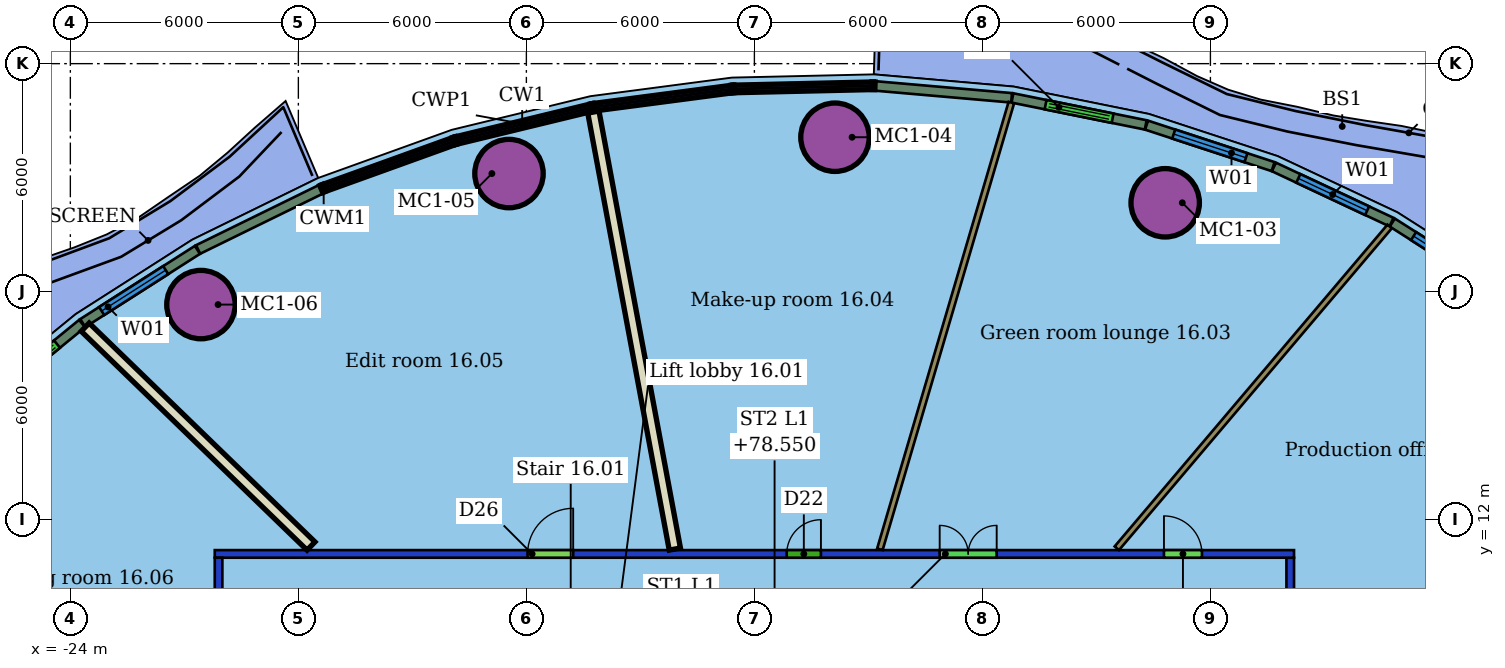
"""IFC4 building model, lengths in metres.
Left out: names, types, materials, properties, quantities, classifications, styles, units other than length and angle.
Written with IfcOpenShell. Run it as: python <this file> out.ifc"""

import sys

from ifc_helpers import new_model, si_unit, direction, frame, frame_2d, origin, origin_2d, place, context, subcontext, project, spatial, rectangle, hollow_circle, extrude, element, fill, save


model = new_model("IFC4")
c1 = context("Model", 3, precision=1e-05, world=origin(), true_north=direction((0.0, 1.0)))
c2 = subcontext(c1, "Body", "Model", "MODEL_VIEW")
j1 = project(units=[si_unit("LENGTHUNIT", "METRE"), si_unit("PLANEANGLEUNIT", "RADIAN")], contexts=[c1])
p1 = place(None, origin())
s1 = spatial("IfcSite", under=j1, at=p1, CompositionType="ELEMENT")
p2 = place(p1, origin())
s2 = spatial("IfcBuilding", under=s1, at=p2, CompositionType="ELEMENT")
p3 = place(p2, frame((0.0, 0.0, 76.7)))
s3 = spatial("IfcBuildingStorey", under=s2, at=p3, CompositionType="ELEMENT", Elevation=76.7)
for number, where, z_axis, x_axis in (
    (1, (4.81, 20.339, 0.0), (0.0, 0.0, 1.0), (1.0, 0.0, 0.0)),
    (2, (-3.879, 22.064, 0.0), (0.0, 0.0, 1.0), (1.0, 0.0, 0.0)),
    (3, (-12.458, 21.108, 0.0), (0.0, 0.0, 1.0), (1.0, 0.0, 0.0)),
    (4, (-20.563, 17.66, 0.0), (0.0, 0.0, 1.0), (1.0, 0.0, 0.0)),
):
    element("IfcColumn", number, at=place(p3, frame(where, z_axis=z_axis, x_axis=x_axis)), inside=s3, PredefinedType="COLUMN", context=c2, shape_type="SweptSolid", body=[
        extrude(hollow_circle(Radius=0.9, WallThickness=0.06, at=origin_2d()), origin(), (0.0, 0.0, 1.0), 3.55),
    ])
p4 = place(p3, frame((-20.1, -11.0, 0.0), z_axis=(0.0, 0.0, 1.0), x_axis=(0.0, 1.0, 0.0)))
e5 = element("IfcWall", 5, at=p4, inside=s3, PredefinedType="PARTITIONING", context=c2, shape_type="SweptSolid", body=[
    extrude(rectangle(XDim=22.0, YDim=0.2, at=frame_2d((11.0, 0.0))), origin(), (0.0, 0.0, 1.0), 2.85),
])
p5 = place(p4, frame((18.191, 0.0, 0.0)))
e6 = element("IfcOpeningElement", 6, at=p5, cuts=e5, PredefinedType="OPENING", context=c2, shape_type="SweptSolid", body=[
    extrude(rectangle(XDim=0.9, YDim=2.1, at=frame_2d((0.45, 1.05))), frame((0.0, 0.11, 0.0), z_axis=(0.0, -1.0, 0.0), x_axis=(1.0, 0.0, 0.0)), (0.0, 0.0, 1.0), 0.22),
])
p6 = place(p4, frame((14.06, 0.0, 0.0)))
e7 = element("IfcOpeningElement", 7, at=p6, cuts=e5, PredefinedType="OPENING", context=c2, shape_type="SweptSolid", body=[
    extrude(rectangle(XDim=1.1, YDim=2.1, at=frame_2d((0.55, 1.05))), frame((0.0, 0.11, 0.0), z_axis=(0.0, -1.0, 0.0), x_axis=(1.0, 0.0, 0.0)), (0.0, 0.0, 1.0), 0.22),
])
p7 = place(p4, frame((9.116, 0.0, 0.0)))
e8 = element("IfcOpeningElement", 8, at=p7, cuts=e5, PredefinedType="OPENING", context=c2, shape_type="SweptSolid", body=[
    extrude(rectangle(XDim=1.2, YDim=2.1, at=frame_2d((0.6, 1.05))), frame((0.0, 0.11, 0.0), z_axis=(0.0, -1.0, 0.0), x_axis=(1.0, 0.0, 0.0)), (0.0, 0.0, 1.0), 0.22),
])
p8 = place(p4, frame((5.868, 0.0, 0.0)))
e9 = element("IfcOpeningElement", 9, at=p8, cuts=e5, PredefinedType="OPENING", context=c2, shape_type="SweptSolid", body=[
    extrude(rectangle(XDim=1.0, YDim=2.1, at=frame_2d((0.5, 1.05))), frame((0.0, 0.11, 0.0), z_axis=(0.0, -1.0, 0.0), x_axis=(1.0, 0.0, 0.0)), (0.0, 0.0, 1.0), 0.22),
])
p9 = place(p3, frame((-20.2, 11.1, 0.0), z_axis=(0.0, 0.0, 1.0), x_axis=(1.0, 0.0, 0.0)))
e10 = element("IfcWall", 10, at=p9, inside=s3, PredefinedType="PARTITIONING", context=c2, shape_type="SweptSolid", body=[
    extrude(rectangle(XDim=28.4, YDim=0.2, at=frame_2d((14.2, 0.0))), origin(), (0.0, 0.0, 1.0), 2.85),
])
p10 = place(p9, frame((24.977, 0.0, 0.0)))
e11 = element("IfcOpeningElement", 11, at=p10, cuts=e10, PredefinedType="OPENING", context=c2, shape_type="SweptSolid", body=[
    extrude(rectangle(XDim=1.0, YDim=2.1, at=frame_2d((0.5, 1.05))), frame((0.0, 0.11, 0.0), z_axis=(0.0, -1.0, 0.0), x_axis=(1.0, 0.0, 0.0)), (0.0, 0.0, 1.0), 0.22),
])
p11 = place(p9, frame((19.076, 0.0, 0.0)))
e12 = element("IfcOpeningElement", 12, at=p11, cuts=e10, PredefinedType="OPENING", context=c2, shape_type="SweptSolid", body=[
    extrude(rectangle(XDim=1.5, YDim=2.1, at=frame_2d((0.75, 1.05))), frame((0.0, 0.11, 0.0), z_axis=(0.0, -1.0, 0.0), x_axis=(1.0, 0.0, 0.0)), (0.0, 0.0, 1.0), 0.22),
])
p12 = place(p9, frame((15.051, 0.0, 0.0)))
e13 = element("IfcOpeningElement", 13, at=p12, cuts=e10, PredefinedType="OPENING", context=c2, shape_type="SweptSolid", body=[
    extrude(rectangle(XDim=0.9, YDim=2.1, at=frame_2d((0.45, 1.05))), frame((0.0, 0.11, 0.0), z_axis=(0.0, -1.0, 0.0), x_axis=(1.0, 0.0, 0.0)), (0.0, 0.0, 1.0), 0.22),
])
p13 = place(p9, frame((8.231, 0.0, 0.0)))
e14 = element("IfcOpeningElement", 14, at=p13, cuts=e10, PredefinedType="OPENING", context=c2, shape_type="SweptSolid", body=[
    extrude(rectangle(XDim=1.2, YDim=2.1, at=frame_2d((0.6, 1.05))), frame((0.0, 0.11, 0.0), z_axis=(0.0, -1.0, 0.0), x_axis=(1.0, 0.0, 0.0)), (0.0, 0.0, 1.0), 0.22),
])
p14 = place(p3, frame((8.1, 11.0, 0.0), z_axis=(0.0, 0.0, 1.0), x_axis=(0.0, -1.0, 0.0)))
e15 = element("IfcWall", 15, at=p14, inside=s3, PredefinedType="PARTITIONING", context=c2, shape_type="SweptSolid", body=[
    extrude(rectangle(XDim=22.0, YDim=0.2, at=frame_2d((11.0, 0.0))), origin(), (0.0, 0.0, 1.0), 2.85),
])
p15 = place(p14, frame((5.898, 0.0, 0.0)))
e16 = element("IfcOpeningElement", 16, at=p15, cuts=e15, PredefinedType="OPENING", context=c2, shape_type="SweptSolid", body=[
    extrude(rectangle(XDim=1.0, YDim=2.1, at=frame_2d((0.5, 1.05))), frame((0.0, 0.11, 0.0), z_axis=(0.0, -1.0, 0.0), x_axis=(1.0, 0.0, 0.0)), (0.0, 0.0, 1.0), 0.22),
])
p16 = place(p14, frame((16.7, 0.0, 0.0)))
e17 = element("IfcOpeningElement", 17, at=p16, cuts=e15, PredefinedType="OPENING", context=c2, shape_type="SweptSolid", body=[
    extrude(rectangle(XDim=1.5, YDim=2.1, at=frame_2d((0.75, 1.05))), frame((0.0, 0.11, 0.0), z_axis=(0.0, -1.0, 0.0), x_axis=(1.0, 0.0, 0.0)), (0.0, 0.0, 1.0), 0.22),
])
p17 = place(p14, frame((12.749, 0.0, 0.0)))
e18 = element("IfcOpeningElement", 18, at=p17, cuts=e15, PredefinedType="OPENING", context=c2, shape_type="SweptSolid", body=[
    extrude(rectangle(XDim=1.1, YDim=2.1, at=frame_2d((0.55, 1.05))), frame((0.0, 0.11, 0.0), z_axis=(0.0, -1.0, 0.0), x_axis=(1.0, 0.0, 0.0)), (0.0, 0.0, 1.0), 0.22),
])
p18 = place(p14, frame((9.026, 0.0, 0.0)))
e19 = element("IfcOpeningElement", 19, at=p18, cuts=e15, PredefinedType="OPENING", context=c2, shape_type="SweptSolid", body=[
    extrude(rectangle(XDim=1.5, YDim=2.1, at=frame_2d((0.75, 1.05))), frame((0.0, 0.11, 0.0), z_axis=(0.0, -1.0, 0.0), x_axis=(1.0, 0.0, 0.0)), (0.0, 0.0, 1.0), 0.22),
])
p19 = place(p3, frame((18.104, 13.463, 0.0), z_axis=(0.0, 0.0, 1.0), x_axis=(-0.873053971866, -0.4876235866, 0.0)))
e20 = element("IfcWall", 20, at=p19, inside=s3, PredefinedType="PARTITIONING", context=c2, shape_type="SweptSolid", body=[
    extrude(rectangle(XDim=11.317, YDim=0.1, at=frame_2d((5.658, 0.0))), origin(), (0.0, 0.0, 1.0), 3.55),
])
p20 = place(p3, frame((10.716, 19.716, 0.0), z_axis=(0.0, 0.0, 1.0), x_axis=(-0.646692205785, -0.762751067503, 0.0)))
e21 = element("IfcWall", 21, at=p20, inside=s3, PredefinedType="PARTITIONING", context=c2, shape_type="SweptSolid", body=[
    extrude(rectangle(XDim=11.101, YDim=0.15, at=frame_2d((5.55, 0.0))), origin(), (0.0, 0.0, 1.0), 3.55),
])
p21 = place(p3, frame((0.762, 22.976, 0.0), z_axis=(0.0, 0.0, 1.0), x_axis=(-0.282322729793, -0.959319486012, 0.0)))
e22 = element("IfcWall", 22, at=p21, inside=s3, PredefinedType="PARTITIONING", context=c2, shape_type="SweptSolid", body=[
    extrude(rectangle(XDim=12.254, YDim=0.15, at=frame_2d((6.127, 0.0))), origin(), (0.0, 0.0, 1.0), 3.55),
])
p22 = place(p3, frame((-10.237, 22.726, 0.0), z_axis=(0.0, 0.0, 1.0), x_axis=(0.183262598903, -0.983063995803, 0.0)))
e23 = element("IfcWall", 23, at=p22, inside=s3, PredefinedType="PARTITIONING", context=c2, shape_type="SweptSolid", body=[
    extrude(rectangle(XDim=11.697, YDim=0.3, at=frame_2d((5.848, 0.0))), origin(), (0.0, 0.0, 1.0), 3.55),
])
p23 = place(p3, frame((-23.609, 17.066, 0.0), z_axis=(0.0, 0.0, 1.0), x_axis=(0.718084916204, -0.695955496508, 0.0)))
e24 = element("IfcWall", 24, at=p23, inside=s3, PredefinedType="PARTITIONING", context=c2, shape_type="SweptSolid", body=[
    extrude(rectangle(XDim=8.274, YDim=0.3, at=frame_2d((4.137, 0.0))), origin(), (0.0, 0.0, 1.0), 3.55),
])
p24 = place(p3, frame((13.592, 18.031, 0.0), z_axis=(0.0, 0.0, 1.0), x_axis=(-0.843428771265, 0.537241014632, 0.0)))
e25 = element("IfcWall", 25, at=p24, inside=s3, PredefinedType="SOLIDWALL", context=c2, shape_type="SweptSolid", body=[
    extrude(rectangle(XDim=3.327, YDim=0.25, at=frame_2d((1.664, 0.0))), origin(), (0.0, 0.0, 1.0), 3.15),
])
p25 = place(p24, frame((0.664, 0.0, 0.8)))
e26 = element("IfcOpeningElement", 26, at=p25, cuts=e25, PredefinedType="OPENING", context=c2, shape_type="SweptSolid", body=[
    extrude(rectangle(XDim=2.0, YDim=2.2, at=frame_2d((1.0, 1.1))), frame((0.0, 0.135, 0.0), z_axis=(0.0, -1.0, 0.0), x_axis=(1.0, 0.0, 0.0)), (0.0, 0.0, 1.0), 0.27),
])
p26 = place(p3, frame((10.765, 19.83, 0.0), z_axis=(0.0, 0.0, 1.0), x_axis=(-0.905237504744, 0.424905942538, 0.0)))
e27 = element("IfcWall", 27, at=p26, inside=s3, PredefinedType="SOLIDWALL", context=c2, shape_type="SweptSolid", body=[
    extrude(rectangle(XDim=3.418, YDim=0.25, at=frame_2d((1.709, 0.0))), origin(), (0.0, 0.0, 1.0), 3.15),
])
p27 = place(p26, frame((0.709, 0.0, 0.8)))
e28 = element("IfcOpeningElement", 28, at=p27, cuts=e27, PredefinedType="OPENING", context=c2, shape_type="SweptSolid", body=[
    extrude(rectangle(XDim=2.0, YDim=2.2, at=frame_2d((1.0, 1.1))), frame((0.0, 0.135, 0.0), z_axis=(0.0, -1.0, 0.0), x_axis=(1.0, 0.0, 0.0)), (0.0, 0.0, 1.0), 0.27),
])
p28 = place(p3, frame((7.649, 21.291, 0.0), z_axis=(0.0, 0.0, 1.0), x_axis=(-0.950294453708, 0.311352615617, 0.0)))
e29 = element("IfcWall", 29, at=p28, inside=s3, PredefinedType="SOLIDWALL", context=c2, shape_type="SweptSolid", body=[
    extrude(rectangle(XDim=3.503, YDim=0.25, at=frame_2d((1.752, 0.0))), origin(), (0.0, 0.0, 1.0), 3.15),
])
p29 = place(p28, frame((0.752, 0.0, 0.8)))
e30 = element("IfcOpeningElement", 30, at=p29, cuts=e29, PredefinedType="OPENING", context=c2, shape_type="SweptSolid", body=[
    extrude(rectangle(XDim=2.0, YDim=2.2, at=frame_2d((1.0, 1.1))), frame((0.0, 0.135, 0.0), z_axis=(0.0, -1.0, 0.0), x_axis=(1.0, 0.0, 0.0)), (0.0, 0.0, 1.0), 0.27),
])
p30 = place(p3, frame((4.298, 22.388, 0.0), z_axis=(0.0, 0.0, 1.0), x_axis=(-0.980121435031, 0.198398519635, 0.0)))
e31 = element("IfcWall", 31, at=p30, inside=s3, PredefinedType="SOLIDWALL", context=c2, shape_type="SweptSolid", body=[
    extrude(rectangle(XDim=3.578, YDim=0.25, at=frame_2d((1.789, 0.0))), origin(), (0.0, 0.0, 1.0), 3.15),
])
p31 = place(p30, frame((0.889, 0.0, 0.0)))
e32 = element("IfcOpeningElement", 32, at=p31, cuts=e31, PredefinedType="OPENING", context=c2, shape_type="SweptSolid", body=[
    extrude(rectangle(XDim=1.8, YDim=2.4, at=frame_2d((0.9, 1.2))), frame((0.0, 0.135, 0.0), z_axis=(0.0, -1.0, 0.0), x_axis=(1.0, 0.0, 0.0)), (0.0, 0.0, 1.0), 0.27),
])
p32 = place(p3, frame((0.768, 23.101, 0.0), z_axis=(0.0, 0.0, 1.0), x_axis=(-0.996218891736, 0.086878764662, 0.0)))
e33 = element("IfcWall", 33, at=p32, inside=s3, PredefinedType="SOLIDWALL", context=c2, shape_type="SweptSolid", body=[
    extrude(rectangle(XDim=3.594, YDim=0.25, at=frame_2d((1.797, 0.0))), origin(), (0.0, 0.0, 1.0), 3.15),
])
p33 = place(p3, frame((-17.41, 20.692, 0.0), z_axis=(0.0, 0.0, 1.0), x_axis=(-0.897998084463, -0.439999363978, 0.0)))
e34 = element("IfcWall", 34, at=p33, inside=s3, PredefinedType="SOLIDWALL", context=c2, shape_type="SweptSolid", body=[
    extrude(rectangle(XDim=3.594, YDim=0.25, at=frame_2d((1.797, 0.0))), origin(), (0.0, 0.0, 1.0), 3.15),
])
p34 = place(p3, frame((-20.657, 19.1, 0.0), z_axis=(0.0, 0.0, 1.0), x_axis=(-0.842814889598, -0.538203550594, 0.0)))
e35 = element("IfcWall", 35, at=p34, inside=s3, PredefinedType="SOLIDWALL", context=c2, shape_type="SweptSolid", body=[
    extrude(rectangle(XDim=3.579, YDim=0.25, at=frame_2d((1.789, 0.0))), origin(), (0.0, 0.0, 1.0), 3.15),
])
p35 = place(p34, frame((0.989, 0.0, 0.8)))
e36 = element("IfcOpeningElement", 36, at=p35, cuts=e35, PredefinedType="OPENING", context=c2, shape_type="SweptSolid", body=[
    extrude(rectangle(XDim=2.0, YDim=2.2, at=frame_2d((1.0, 1.1))), frame((0.0, 0.135, 0.0), z_axis=(0.0, -1.0, 0.0), x_axis=(1.0, 0.0, 0.0)), (0.0, 0.0, 1.0), 0.27),
])
p36 = place(p3, frame((-23.691, 17.16, 0.0), z_axis=(0.0, 0.0, 1.0), x_axis=(-0.774224225452, -0.632911406694, 0.0)))
e37 = element("IfcWall", 37, at=p36, inside=s3, PredefinedType="SOLIDWALL", context=c2, shape_type="SweptSolid", body=[
    extrude(rectangle(XDim=3.504, YDim=0.25, at=frame_2d((1.752, 0.0))), origin(), (0.0, 0.0, 1.0), 3.15),
])
p37 = place(p36, frame((0.852, 0.0, 0.0)))
e38 = element("IfcOpeningElement", 38, at=p37, cuts=e37, PredefinedType="OPENING", context=c2, shape_type="SweptSolid", body=[
    extrude(rectangle(XDim=1.8, YDim=2.4, at=frame_2d((0.9, 1.2))), frame((0.0, 0.135, 0.0), z_axis=(0.0, -1.0, 0.0), x_axis=(1.0, 0.0, 0.0)), (0.0, 0.0, 1.0), 0.27),
])
p38 = place(p10, origin())
e39 = element("IfcDoor", 39, at=p38, inside=s3, OperationType="SINGLE_SWING_LEFT", PredefinedType="DOOR", context=c2, shape_type="SweptSolid", body=[
    extrude(rectangle(XDim=1.0, YDim=2.1, at=frame_2d((0.5, 1.05))), frame((0.0, 0.025, 0.0), z_axis=(0.0, -1.0, 0.0), x_axis=(1.0, 0.0, 0.0)), (0.0, 0.0, 1.0), 0.05),
])
fill(e11, e39)
p39 = place(p11, origin())
e40 = element("IfcDoor", 40, at=p39, inside=s3, OperationType="DOUBLE_DOOR_SINGLE_SWING", PredefinedType="DOOR", context=c2, shape_type="SweptSolid", body=[
    extrude(rectangle(XDim=1.5, YDim=2.1, at=frame_2d((0.75, 1.05))), frame((0.0, 0.025, 0.0), z_axis=(0.0, -1.0, 0.0), x_axis=(1.0, 0.0, 0.0)), (0.0, 0.0, 1.0), 0.05),
])
fill(e12, e40)
p40 = place(p12, origin())
e41 = element("IfcDoor", 41, at=p40, inside=s3, OperationType="SINGLE_SWING_RIGHT", PredefinedType="DOOR", context=c2, shape_type="SweptSolid", body=[
    extrude(rectangle(XDim=0.9, YDim=2.1, at=frame_2d((0.45, 1.05))), frame((0.0, 0.025, 0.0), z_axis=(0.0, -1.0, 0.0), x_axis=(1.0, 0.0, 0.0)), (0.0, 0.0, 1.0), 0.05),
])
fill(e13, e41)
p41 = place(p13, origin())
e42 = element("IfcDoor", 42, at=p41, inside=s3, OperationType="SINGLE_SWING_RIGHT", PredefinedType="DOOR", context=c2, shape_type="SweptSolid", body=[
    extrude(rectangle(XDim=1.2, YDim=2.1, at=frame_2d((0.6, 1.05))), frame((0.0, 0.025, 0.0), z_axis=(0.0, -1.0, 0.0), x_axis=(1.0, 0.0, 0.0)), (0.0, 0.0, 1.0), 0.05),
])
fill(e14, e42)
p42 = place(p25, origin())
e43 = element("IfcWindow", 43, at=p42, inside=s3, PartitioningType="SINGLE_PANEL", PredefinedType="WINDOW", context=c2, shape_type="SweptSolid", body=[
    extrude(rectangle(XDim=2.0, YDim=2.2, at=frame_2d((1.0, 1.1))), frame((0.0, 0.03, 0.0), z_axis=(0.0, -1.0, 0.0), x_axis=(1.0, 0.0, 0.0)), (0.0, 0.0, 1.0), 0.06),
])
fill(e26, e43)
p43 = place(p27, origin())
e44 = element("IfcWindow", 44, at=p43, inside=s3, PartitioningType="SINGLE_PANEL", PredefinedType="WINDOW", context=c2, shape_type="SweptSolid", body=[
    extrude(rectangle(XDim=2.0, YDim=2.2, at=frame_2d((1.0, 1.1))), frame((0.0, 0.03, 0.0), z_axis=(0.0, -1.0, 0.0), x_axis=(1.0, 0.0, 0.0)), (0.0, 0.0, 1.0), 0.06),
])
fill(e28, e44)
p44 = place(p29, origin())
e45 = element("IfcWindow", 45, at=p44, inside=s3, PartitioningType="SINGLE_PANEL", PredefinedType="WINDOW", context=c2, shape_type="SweptSolid", body=[
    extrude(rectangle(XDim=2.0, YDim=2.2, at=frame_2d((1.0, 1.1))), frame((0.0, 0.03, 0.0), z_axis=(0.0, -1.0, 0.0), x_axis=(1.0, 0.0, 0.0)), (0.0, 0.0, 1.0), 0.06),
])
fill(e30, e45)
p45 = place(p31, origin())
e46 = element("IfcDoor", 46, at=p45, inside=s3, OperationType="DOUBLE_DOOR_SLIDING", PredefinedType="DOOR", context=c2, shape_type="SweptSolid", body=[
    extrude(rectangle(XDim=1.8, YDim=2.4, at=frame_2d((0.9, 1.2))), frame((0.0, 0.025, 0.0), z_axis=(0.0, -1.0, 0.0), x_axis=(1.0, 0.0, 0.0)), (0.0, 0.0, 1.0), 0.05),
])
fill(e32, e46)
p46 = place(p35, origin())
e47 = element("IfcWindow", 47, at=p46, inside=s3, PartitioningType="SINGLE_PANEL", PredefinedType="WINDOW", context=c2, shape_type="SweptSolid", body=[
    extrude(rectangle(XDim=2.0, YDim=2.2, at=frame_2d((1.0, 1.1))), frame((0.0, 0.03, 0.0), z_axis=(0.0, -1.0, 0.0), x_axis=(1.0, 0.0, 0.0)), (0.0, 0.0, 1.0), 0.06),
])
fill(e36, e47)
p47 = place(p37, origin())
e48 = element("IfcDoor", 48, at=p47, inside=s3, OperationType="DOUBLE_DOOR_SLIDING", PredefinedType="DOOR", context=c2, shape_type="SweptSolid", body=[
    extrude(rectangle(XDim=1.8, YDim=2.4, at=frame_2d((0.9, 1.2))), frame((0.0, 0.025, 0.0), z_axis=(0.0, -1.0, 0.0), x_axis=(1.0, 0.0, 0.0)), (0.0, 0.0, 1.0), 0.05),
])
fill(e38, e48)
save(model, sys.argv[1])
